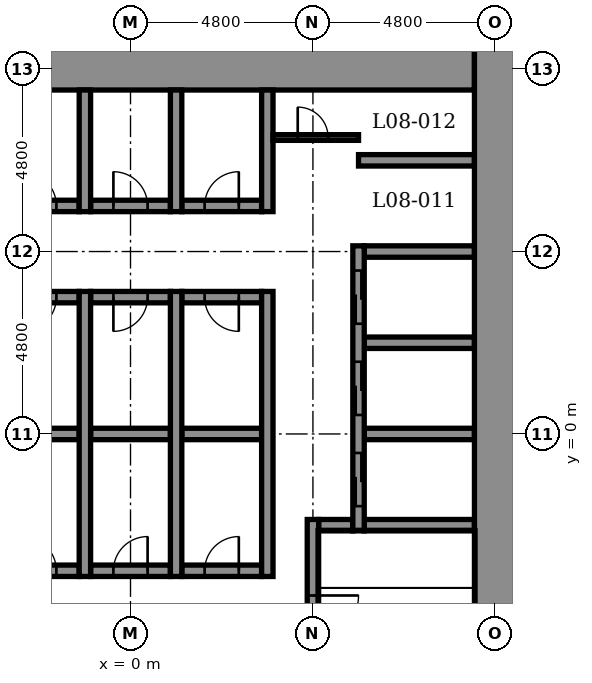
"""IFC4 building model, lengths in metres.
Left out: names, types, materials, properties, quantities, classifications, styles, units other than length and angle.
Written with IfcOpenShell. Run it as: python <this file> out.ifc"""

import sys

from ifc_helpers import new_model, si_unit, direction, frame, frame_2d, origin, place, context, subcontext, project, spatial, rectangle, extrude, element, fill, save


model = new_model("IFC4")
c1 = context("Model", 3, precision=1e-05, world=origin(), true_north=direction((0.0, 1.0)))
c2 = subcontext(c1, "Body", "Model", "MODEL_VIEW")
j1 = project(units=[si_unit("LENGTHUNIT", "METRE"), si_unit("PLANEANGLEUNIT", "RADIAN")], contexts=[c1])
p1 = place(None, origin())
s1 = spatial("IfcSite", under=j1, at=p1, CompositionType="ELEMENT")
p2 = place(p1, origin())
s2 = spatial("IfcBuilding", under=s1, at=p2, CompositionType="ELEMENT")
p3 = place(p2, frame((0.0, 0.0, 44.4)))
s3 = spatial("IfcBuildingStorey", under=s2, at=p3, CompositionType="ELEMENT", Elevation=44.4)
p4 = place(p3, frame((-3.45, -3.6, -0.25), z_axis=(0.0, 0.0, 1.0), x_axis=(1.0, 0.0, 0.0)))
e1 = element("IfcWall", 1, at=p4, inside=s3, PredefinedType="STANDARD", context=c2, shape_type="SweptSolid", body=[
    extrude(rectangle(XDim=2.1, YDim=0.3, at=frame_2d((1.05, 0.0))), origin(), (0.0, 0.0, 1.0), 5.5),
])
p5 = place(p4, frame((0.6, 0.0, 0.25)))
e2 = element("IfcOpeningElement", 2, at=p5, cuts=e1, PredefinedType="OPENING", context=c2, shape_type="SweptSolid", body=[
    extrude(rectangle(XDim=0.9, YDim=2.1, at=frame_2d((0.45, 1.05))), frame((0.0, 0.16, 0.0), z_axis=(0.0, -1.0, 0.0), x_axis=(1.0, 0.0, 0.0)), (0.0, 0.0, 1.0), 0.32),
])
p6 = place(p3, frame((-1.05, -3.6, -0.25), z_axis=(0.0, 0.0, 1.0), x_axis=(1.0, 0.0, 0.0)))
e3 = element("IfcWall", 3, at=p6, inside=s3, PredefinedType="STANDARD", context=c2, shape_type="SweptSolid", body=[
    extrude(rectangle(XDim=2.1, YDim=0.3, at=frame_2d((1.05, 0.0))), origin(), (0.0, 0.0, 1.0), 5.5),
])
p7 = place(p6, frame((0.6, 0.0, 0.25)))
e4 = element("IfcOpeningElement", 4, at=p7, cuts=e3, PredefinedType="OPENING", context=c2, shape_type="SweptSolid", body=[
    extrude(rectangle(XDim=0.9, YDim=2.1, at=frame_2d((0.45, 1.05))), frame((0.0, 0.16, 0.0), z_axis=(0.0, -1.0, 0.0), x_axis=(1.0, 0.0, 0.0)), (0.0, 0.0, 1.0), 0.32),
])
p8 = place(p3, frame((1.35, -3.6, -0.25), z_axis=(0.0, 0.0, 1.0), x_axis=(1.0, 0.0, 0.0)))
e5 = element("IfcWall", 5, at=p8, inside=s3, PredefinedType="STANDARD", context=c2, shape_type="SweptSolid", body=[
    extrude(rectangle(XDim=2.1, YDim=0.3, at=frame_2d((1.05, 0.0))), origin(), (0.0, 0.0, 1.0), 5.5),
])
p9 = place(p8, frame((0.6, 0.0, 0.25)))
e6 = element("IfcOpeningElement", 6, at=p9, cuts=e5, PredefinedType="OPENING", context=c2, shape_type="SweptSolid", body=[
    extrude(rectangle(XDim=0.9, YDim=2.1, at=frame_2d((0.45, 1.05))), frame((0.0, 0.16, 0.0), z_axis=(0.0, -1.0, 0.0), x_axis=(1.0, 0.0, 0.0)), (0.0, 0.0, 1.0), 0.32),
])
p10 = place(p3, frame((4.95, -2.4, -0.25), z_axis=(0.0, 0.0, 1.0), x_axis=(1.0, 0.0, 0.0)))
e7 = element("IfcWall", 7, at=p10, inside=s3, PredefinedType="STANDARD", context=c2, shape_type="SweptSolid", body=[
    extrude(rectangle(XDim=0.9, YDim=0.3, at=frame_2d((0.45, 0.0))), origin(), (0.0, 0.0, 1.0), 5.5),
])
p11 = place(p3, frame((6.15, -2.4, -0.25), z_axis=(0.0, 0.0, 1.0), x_axis=(1.0, 0.0, 0.0)))
e8 = element("IfcWall", 8, at=p11, inside=s3, PredefinedType="STANDARD", context=c2, shape_type="SweptSolid", body=[
    extrude(rectangle(XDim=2.9, YDim=0.3, at=frame_2d((1.45, 0.0))), origin(), (0.0, 0.0, 1.0), 5.5),
])
p12 = place(p3, frame((-3.45, 0.0, -0.25), z_axis=(0.0, 0.0, 1.0), x_axis=(1.0, 0.0, 0.0)))
e9 = element("IfcWall", 9, at=p12, inside=s3, PredefinedType="STANDARD", context=c2, shape_type="SweptSolid", body=[
    extrude(rectangle(XDim=2.1, YDim=0.3, at=frame_2d((1.05, 0.0))), origin(), (0.0, 0.0, 1.0), 5.5),
])
p13 = place(p3, frame((-1.05, 0.0, -0.25), z_axis=(0.0, 0.0, 1.0), x_axis=(1.0, 0.0, 0.0)))
e10 = element("IfcWall", 10, at=p13, inside=s3, PredefinedType="STANDARD", context=c2, shape_type="SweptSolid", body=[
    extrude(rectangle(XDim=2.1, YDim=0.3, at=frame_2d((1.05, 0.0))), origin(), (0.0, 0.0, 1.0), 5.5),
])
p14 = place(p3, frame((1.35, 0.0, -0.25), z_axis=(0.0, 0.0, 1.0), x_axis=(1.0, 0.0, 0.0)))
e11 = element("IfcWall", 11, at=p14, inside=s3, PredefinedType="STANDARD", context=c2, shape_type="SweptSolid", body=[
    extrude(rectangle(XDim=2.1, YDim=0.3, at=frame_2d((1.05, 0.0))), origin(), (0.0, 0.0, 1.0), 5.5),
])
for number, where, z_axis, x_axis in (
    (12, (6.15, 0.0, -0.25), (0.0, 0.0, 1.0), (1.0, 0.0, 0.0)),
    (13, (6.15, 2.4, -0.25), (0.0, 0.0, 1.0), (1.0, 0.0, 0.0)),
):
    element("IfcWall", number, at=place(p3, frame(where, z_axis=z_axis, x_axis=x_axis)), inside=s3, PredefinedType="STANDARD", context=c2, shape_type="SweptSolid", body=[
        extrude(rectangle(XDim=2.9, YDim=0.3, at=frame_2d((1.45, 0.0))), origin(), (0.0, 0.0, 1.0), 5.5),
    ])
p15 = place(p3, frame((-3.45, 3.6, -0.25), z_axis=(0.0, 0.0, 1.0), x_axis=(1.0, 0.0, 0.0)))
e14 = element("IfcWall", 14, at=p15, inside=s3, PredefinedType="STANDARD", context=c2, shape_type="SweptSolid", body=[
    extrude(rectangle(XDim=2.1, YDim=0.3, at=frame_2d((1.05, 0.0))), origin(), (0.0, 0.0, 1.0), 5.5),
])
p16 = place(p15, frame((0.6, 0.0, 0.25)))
e15 = element("IfcOpeningElement", 15, at=p16, cuts=e14, PredefinedType="OPENING", context=c2, shape_type="SweptSolid", body=[
    extrude(rectangle(XDim=0.9, YDim=2.1, at=frame_2d((0.45, 1.05))), frame((0.0, 0.16, 0.0), z_axis=(0.0, -1.0, 0.0), x_axis=(1.0, 0.0, 0.0)), (0.0, 0.0, 1.0), 0.32),
])
p17 = place(p3, frame((-1.05, 3.6, -0.25), z_axis=(0.0, 0.0, 1.0), x_axis=(1.0, 0.0, 0.0)))
e16 = element("IfcWall", 16, at=p17, inside=s3, PredefinedType="STANDARD", context=c2, shape_type="SweptSolid", body=[
    extrude(rectangle(XDim=2.1, YDim=0.3, at=frame_2d((1.05, 0.0))), origin(), (0.0, 0.0, 1.0), 5.5),
])
p18 = place(p17, frame((0.6, 0.0, 0.25)))
e17 = element("IfcOpeningElement", 17, at=p18, cuts=e16, PredefinedType="OPENING", context=c2, shape_type="SweptSolid", body=[
    extrude(rectangle(XDim=0.9, YDim=2.1, at=frame_2d((0.45, 1.05))), frame((0.0, 0.16, 0.0), z_axis=(0.0, -1.0, 0.0), x_axis=(1.0, 0.0, 0.0)), (0.0, 0.0, 1.0), 0.32),
])
p19 = place(p3, frame((1.35, 3.6, -0.25), z_axis=(0.0, 0.0, 1.0), x_axis=(1.0, 0.0, 0.0)))
e18 = element("IfcWall", 18, at=p19, inside=s3, PredefinedType="STANDARD", context=c2, shape_type="SweptSolid", body=[
    extrude(rectangle(XDim=2.1, YDim=0.3, at=frame_2d((1.05, 0.0))), origin(), (0.0, 0.0, 1.0), 5.5),
])
p20 = place(p19, frame((0.6, 0.0, 0.25)))
e19 = element("IfcOpeningElement", 19, at=p20, cuts=e18, PredefinedType="OPENING", context=c2, shape_type="SweptSolid", body=[
    extrude(rectangle(XDim=0.9, YDim=2.1, at=frame_2d((0.45, 1.05))), frame((0.0, 0.16, 0.0), z_axis=(0.0, -1.0, 0.0), x_axis=(1.0, 0.0, 0.0)), (0.0, 0.0, 1.0), 0.32),
])
p21 = place(p3, frame((6.15, 4.8, -0.25), z_axis=(0.0, 0.0, 1.0), x_axis=(1.0, 0.0, 0.0)))
e20 = element("IfcWall", 20, at=p21, inside=s3, PredefinedType="STANDARD", context=c2, shape_type="SweptSolid", body=[
    extrude(rectangle(XDim=2.9, YDim=0.3, at=frame_2d((1.45, 0.0))), origin(), (0.0, 0.0, 1.0), 5.5),
])
p22 = place(p3, frame((-3.45, 6.0, -0.25), z_axis=(0.0, 0.0, 1.0), x_axis=(1.0, 0.0, 0.0)))
e21 = element("IfcWall", 21, at=p22, inside=s3, PredefinedType="STANDARD", context=c2, shape_type="SweptSolid", body=[
    extrude(rectangle(XDim=2.1, YDim=0.3, at=frame_2d((1.05, 0.0))), origin(), (0.0, 0.0, 1.0), 5.5),
])
p23 = place(p22, frame((0.6, 0.0, 0.25)))
e22 = element("IfcOpeningElement", 22, at=p23, cuts=e21, PredefinedType="OPENING", context=c2, shape_type="SweptSolid", body=[
    extrude(rectangle(XDim=0.9, YDim=2.1, at=frame_2d((0.45, 1.05))), frame((0.0, 0.16, 0.0), z_axis=(0.0, -1.0, 0.0), x_axis=(1.0, 0.0, 0.0)), (0.0, 0.0, 1.0), 0.32),
])
p24 = place(p3, frame((-1.05, 6.0, -0.25), z_axis=(0.0, 0.0, 1.0), x_axis=(1.0, 0.0, 0.0)))
e23 = element("IfcWall", 23, at=p24, inside=s3, PredefinedType="STANDARD", context=c2, shape_type="SweptSolid", body=[
    extrude(rectangle(XDim=2.1, YDim=0.3, at=frame_2d((1.05, 0.0))), origin(), (0.0, 0.0, 1.0), 5.5),
])
p25 = place(p24, frame((0.6, 0.0, 0.25)))
e24 = element("IfcOpeningElement", 24, at=p25, cuts=e23, PredefinedType="OPENING", context=c2, shape_type="SweptSolid", body=[
    extrude(rectangle(XDim=0.9, YDim=2.1, at=frame_2d((0.45, 1.05))), frame((0.0, 0.16, 0.0), z_axis=(0.0, -1.0, 0.0), x_axis=(1.0, 0.0, 0.0)), (0.0, 0.0, 1.0), 0.32),
])
p26 = place(p3, frame((1.35, 6.0, -0.25), z_axis=(0.0, 0.0, 1.0), x_axis=(1.0, 0.0, 0.0)))
e25 = element("IfcWall", 25, at=p26, inside=s3, PredefinedType="STANDARD", context=c2, shape_type="SweptSolid", body=[
    extrude(rectangle(XDim=2.1, YDim=0.3, at=frame_2d((1.05, 0.0))), origin(), (0.0, 0.0, 1.0), 5.5),
])
p27 = place(p26, frame((0.6, 0.0, 0.25)))
e26 = element("IfcOpeningElement", 26, at=p27, cuts=e25, PredefinedType="OPENING", context=c2, shape_type="SweptSolid", body=[
    extrude(rectangle(XDim=0.9, YDim=2.1, at=frame_2d((0.45, 1.05))), frame((0.0, 0.16, 0.0), z_axis=(0.0, -1.0, 0.0), x_axis=(1.0, 0.0, 0.0)), (0.0, 0.0, 1.0), 0.32),
])
p28 = place(p3, frame((6.0, 7.2, -0.25), z_axis=(0.0, 0.0, 1.0), x_axis=(1.0, 0.0, 0.0)))
e27 = element("IfcWall", 27, at=p28, inside=s3, PredefinedType="STANDARD", context=c2, shape_type="SweptSolid", body=[
    extrude(rectangle(XDim=3.05, YDim=0.3, at=frame_2d((1.525, 0.0))), origin(), (0.0, 0.0, 1.0), 5.5),
])
p29 = place(p3, frame((-5.25, 9.6, -0.25), z_axis=(0.0, 0.0, 1.0), x_axis=(1.0, 0.0, 0.0)))
e28 = element("IfcWall", 28, at=p29, inside=s3, PredefinedType="SHEAR", context=c2, shape_type="SweptSolid", body=[
    extrude(rectangle(XDim=14.3, YDim=1.1, at=frame_2d((7.15, 0.0))), origin(), (0.0, 0.0, 1.0), 5.5),
])
p30 = place(p29, frame((0.6, 0.0, 0.25)))
e29 = element("IfcOpeningElement", 29, at=p30, cuts=e28, PredefinedType="OPENING", context=c2, shape_type="SweptSolid", body=[
    extrude(rectangle(XDim=0.9, YDim=2.1, at=frame_2d((0.45, 1.05))), frame((0.0, 0.56, 0.0), z_axis=(0.0, -1.0, 0.0), x_axis=(1.0, 0.0, 0.0)), (0.0, 0.0, 1.0), 1.12),
])
p31 = place(p3, frame((-1.2, -3.75, -0.25), z_axis=(0.0, 0.0, 1.0), x_axis=(0.0, 1.0, 0.0)))
e30 = element("IfcWall", 30, at=p31, inside=s3, PredefinedType="STANDARD", context=c2, shape_type="SweptSolid", body=[
    extrude(rectangle(XDim=7.5, YDim=0.3, at=frame_2d((3.75, 0.0))), origin(), (0.0, 0.0, 1.0), 5.5),
])
p32 = place(p3, frame((-1.2, 5.85, -0.25), z_axis=(0.0, 0.0, 1.0), x_axis=(0.0, 1.0, 0.0)))
e31 = element("IfcWall", 31, at=p32, inside=s3, PredefinedType="STANDARD", context=c2, shape_type="SweptSolid", body=[
    extrude(rectangle(XDim=3.2, YDim=0.3, at=frame_2d((1.6, 0.0))), origin(), (0.0, 0.0, 1.0), 5.5),
])
p33 = place(p3, frame((1.2, -3.75, -0.25), z_axis=(0.0, 0.0, 1.0), x_axis=(0.0, 1.0, 0.0)))
e32 = element("IfcWall", 32, at=p33, inside=s3, PredefinedType="STANDARD", context=c2, shape_type="SweptSolid", body=[
    extrude(rectangle(XDim=7.5, YDim=0.3, at=frame_2d((3.75, 0.0))), origin(), (0.0, 0.0, 1.0), 5.5),
])
p34 = place(p3, frame((1.2, 5.85, -0.25), z_axis=(0.0, 0.0, 1.0), x_axis=(0.0, 1.0, 0.0)))
e33 = element("IfcWall", 33, at=p34, inside=s3, PredefinedType="STANDARD", context=c2, shape_type="SweptSolid", body=[
    extrude(rectangle(XDim=3.2, YDim=0.3, at=frame_2d((1.6, 0.0))), origin(), (0.0, 0.0, 1.0), 5.5),
])
p35 = place(p3, frame((3.6, -3.75, -0.25), z_axis=(0.0, 0.0, 1.0), x_axis=(0.0, 1.0, 0.0)))
e34 = element("IfcWall", 34, at=p35, inside=s3, PredefinedType="STANDARD", context=c2, shape_type="SweptSolid", body=[
    extrude(rectangle(XDim=7.5, YDim=0.3, at=frame_2d((3.75, 0.0))), origin(), (0.0, 0.0, 1.0), 5.5),
])
p36 = place(p3, frame((3.6, 5.85, -0.25), z_axis=(0.0, 0.0, 1.0), x_axis=(0.0, 1.0, 0.0)))
e35 = element("IfcWall", 35, at=p36, inside=s3, PredefinedType="STANDARD", context=c2, shape_type="SweptSolid", body=[
    extrude(rectangle(XDim=3.2, YDim=0.3, at=frame_2d((1.6, 0.0))), origin(), (0.0, 0.0, 1.0), 5.5),
])
p37 = place(p3, frame((4.8, -9.05, -0.25), z_axis=(0.0, 0.0, 1.0), x_axis=(0.0, 1.0, 0.0)))
e36 = element("IfcWall", 36, at=p37, inside=s3, PredefinedType="STANDARD", context=c2, shape_type="SweptSolid", body=[
    extrude(rectangle(XDim=6.8, YDim=0.3, at=frame_2d((3.4, 0.0))), origin(), (0.0, 0.0, 1.0), 5.5),
])
p38 = place(p37, frame((3.6, 0.0, 0.25)))
e37 = element("IfcOpeningElement", 37, at=p38, cuts=e36, PredefinedType="OPENING", context=c2, shape_type="SweptSolid", body=[
    extrude(rectangle(XDim=1.2, YDim=2.1, at=frame_2d((0.6, 1.05))), frame((0.0, 0.16, 0.0), z_axis=(0.0, -1.0, 0.0), x_axis=(1.0, 0.0, 0.0)), (0.0, 0.0, 1.0), 0.32),
])
p39 = place(p3, frame((6.0, -2.55, -0.25), z_axis=(0.0, 0.0, 1.0), x_axis=(0.0, 1.0, 0.0)))
e38 = element("IfcWall", 38, at=p39, inside=s3, PredefinedType="STANDARD", context=c2, shape_type="SweptSolid", body=[
    extrude(rectangle(XDim=7.5, YDim=0.3, at=frame_2d((3.75, 0.0))), origin(), (0.0, 0.0, 1.0), 5.5),
])
p40 = place(p39, frame((0.65, 0.0, 0.25)))
e39 = element("IfcOpeningElement", 39, at=p40, cuts=e38, PredefinedType="OPENING", context=c2, shape_type="SweptSolid", body=[
    extrude(rectangle(XDim=1.4, YDim=2.1, at=frame_2d((0.7, 1.05))), frame((0.0, 0.16, 0.0), z_axis=(0.0, -1.0, 0.0), x_axis=(1.0, 0.0, 0.0)), (0.0, 0.0, 1.0), 0.32),
])
p41 = place(p39, frame((3.05, 0.0, 0.25)))
e40 = element("IfcOpeningElement", 40, at=p41, cuts=e38, PredefinedType="OPENING", context=c2, shape_type="SweptSolid", body=[
    extrude(rectangle(XDim=1.4, YDim=2.1, at=frame_2d((0.7, 1.05))), frame((0.0, 0.16, 0.0), z_axis=(0.0, -1.0, 0.0), x_axis=(1.0, 0.0, 0.0)), (0.0, 0.0, 1.0), 0.32),
])
p42 = place(p39, frame((5.45, 0.0, 0.25)))
e41 = element("IfcOpeningElement", 41, at=p42, cuts=e38, PredefinedType="OPENING", context=c2, shape_type="SweptSolid", body=[
    extrude(rectangle(XDim=1.4, YDim=2.1, at=frame_2d((0.7, 1.05))), frame((0.0, 0.16, 0.0), z_axis=(0.0, -1.0, 0.0), x_axis=(1.0, 0.0, 0.0)), (0.0, 0.0, 1.0), 0.32),
])
p43 = place(p3, frame((9.6, -10.15, -0.25), z_axis=(0.0, 0.0, 1.0), x_axis=(0.0, 1.0, 0.0)))
e42 = element("IfcWall", 42, at=p43, inside=s3, PredefinedType="SHEAR", context=c2, shape_type="SweptSolid", body=[
    extrude(rectangle(XDim=20.3, YDim=1.1, at=frame_2d((10.15, 0.0))), origin(), (0.0, 0.0, 1.0), 5.5),
])
p44 = place(p3, frame((3.75, 7.8, 0.0), z_axis=(0.0, 0.0, 1.0), x_axis=(1.0, 0.0, 0.0)))
e43 = element("IfcWall", 43, at=p44, inside=s3, PredefinedType="PARTITIONING", context=c2, shape_type="SweptSolid", body=[
    extrude(rectangle(XDim=2.25, YDim=0.15, at=frame_2d((1.125, 0.0))), origin(), (0.0, 0.0, 1.0), 5.25),
])
p45 = place(p44, frame((0.65, 0.0, 0.0)))
e44 = element("IfcOpeningElement", 44, at=p45, cuts=e43, PredefinedType="OPENING", context=c2, shape_type="SweptSolid", body=[
    extrude(rectangle(XDim=0.8, YDim=2.1, at=frame_2d((0.4, 1.05))), frame((0.0, 0.085, 0.0), z_axis=(0.0, -1.0, 0.0), x_axis=(1.0, 0.0, 0.0)), (0.0, 0.0, 1.0), 0.17),
])
p46 = place(p45, origin())
e45 = element("IfcDoor", 45, at=p46, inside=s3, OperationType="SINGLE_SWING_LEFT", PredefinedType="DOOR", context=c2, shape_type="SweptSolid", body=[
    extrude(rectangle(XDim=0.8, YDim=2.1, at=frame_2d((0.4, 1.05))), frame((0.0, 0.025, 0.0), z_axis=(0.0, -1.0, 0.0), x_axis=(1.0, 0.0, 0.0)), (0.0, 0.0, 1.0), 0.05),
])
fill(e44, e45)
p47 = place(p40, origin())
e46 = element("IfcDoor", 46, at=p47, inside=s3, OperationType="DOUBLE_DOOR_SLIDING", PredefinedType="DOOR", context=c2, shape_type="SweptSolid", body=[
    extrude(rectangle(XDim=1.4, YDim=2.1, at=frame_2d((0.7, 1.05))), frame((0.0, 0.025, 0.0), z_axis=(0.0, -1.0, 0.0), x_axis=(1.0, 0.0, 0.0)), (0.0, 0.0, 1.0), 0.05),
])
fill(e39, e46)
p48 = place(p41, origin())
e47 = element("IfcDoor", 47, at=p48, inside=s3, OperationType="DOUBLE_DOOR_SLIDING", PredefinedType="DOOR", context=c2, shape_type="SweptSolid", body=[
    extrude(rectangle(XDim=1.4, YDim=2.1, at=frame_2d((0.7, 1.05))), frame((0.0, 0.025, 0.0), z_axis=(0.0, -1.0, 0.0), x_axis=(1.0, 0.0, 0.0)), (0.0, 0.0, 1.0), 0.05),
])
fill(e40, e47)
p49 = place(p42, origin())
e48 = element("IfcDoor", 48, at=p49, inside=s3, OperationType="DOUBLE_DOOR_SLIDING", PredefinedType="DOOR", context=c2, shape_type="SweptSolid", body=[
    extrude(rectangle(XDim=1.4, YDim=2.1, at=frame_2d((0.7, 1.05))), frame((0.0, 0.025, 0.0), z_axis=(0.0, -1.0, 0.0), x_axis=(1.0, 0.0, 0.0)), (0.0, 0.0, 1.0), 0.05),
])
fill(e41, e48)
p50 = place(p38, frame((1.2, 0.0, 0.0), z_axis=(0.0, 0.0, 1.0), x_axis=(-1.0, 0.0, 0.0)))
e49 = element("IfcDoor", 49, at=p50, inside=s3, OperationType="SINGLE_SWING_RIGHT", PredefinedType="DOOR", context=c2, shape_type="SweptSolid", body=[
    extrude(rectangle(XDim=1.2, YDim=2.1, at=frame_2d((0.6, 1.05))), frame((0.0, 0.025, 0.0), z_axis=(0.0, -1.0, 0.0), x_axis=(1.0, 0.0, 0.0)), (0.0, 0.0, 1.0), 0.05),
])
fill(e37, e49)
p51 = place(p23, origin())
e50 = element("IfcDoor", 50, at=p51, inside=s3, OperationType="SINGLE_SWING_LEFT", PredefinedType="DOOR", context=c2, shape_type="SweptSolid", body=[
    extrude(rectangle(XDim=0.9, YDim=2.1, at=frame_2d((0.45, 1.05))), frame((0.0, 0.025, 0.0), z_axis=(0.0, -1.0, 0.0), x_axis=(1.0, 0.0, 0.0)), (0.0, 0.0, 1.0), 0.05),
])
fill(e22, e50)
p52 = place(p25, origin())
e51 = element("IfcDoor", 51, at=p52, inside=s3, OperationType="SINGLE_SWING_LEFT", PredefinedType="DOOR", context=c2, shape_type="SweptSolid", body=[
    extrude(rectangle(XDim=0.9, YDim=2.1, at=frame_2d((0.45, 1.05))), frame((0.0, 0.025, 0.0), z_axis=(0.0, -1.0, 0.0), x_axis=(1.0, 0.0, 0.0)), (0.0, 0.0, 1.0), 0.05),
])
fill(e24, e51)
p53 = place(p27, origin())
e52 = element("IfcDoor", 52, at=p53, inside=s3, OperationType="SINGLE_SWING_RIGHT", PredefinedType="DOOR", context=c2, shape_type="SweptSolid", body=[
    extrude(rectangle(XDim=0.9, YDim=2.1, at=frame_2d((0.45, 1.05))), frame((0.0, 0.025, 0.0), z_axis=(0.0, -1.0, 0.0), x_axis=(1.0, 0.0, 0.0)), (0.0, 0.0, 1.0), 0.05),
])
fill(e26, e52)
p54 = place(p16, frame((0.9, 0.0, 0.0), z_axis=(0.0, 0.0, 1.0), x_axis=(-1.0, 0.0, 0.0)))
e53 = element("IfcDoor", 53, at=p54, inside=s3, OperationType="SINGLE_SWING_LEFT", PredefinedType="DOOR", context=c2, shape_type="SweptSolid", body=[
    extrude(rectangle(XDim=0.9, YDim=2.1, at=frame_2d((0.45, 1.05))), frame((0.0, 0.025, 0.0), z_axis=(0.0, -1.0, 0.0), x_axis=(1.0, 0.0, 0.0)), (0.0, 0.0, 1.0), 0.05),
])
fill(e15, e53)
p55 = place(p18, frame((0.9, 0.0, 0.0), z_axis=(0.0, 0.0, 1.0), x_axis=(-1.0, 0.0, 0.0)))
e54 = element("IfcDoor", 54, at=p55, inside=s3, OperationType="SINGLE_SWING_LEFT", PredefinedType="DOOR", context=c2, shape_type="SweptSolid", body=[
    extrude(rectangle(XDim=0.9, YDim=2.1, at=frame_2d((0.45, 1.05))), frame((0.0, 0.025, 0.0), z_axis=(0.0, -1.0, 0.0), x_axis=(1.0, 0.0, 0.0)), (0.0, 0.0, 1.0), 0.05),
])
fill(e17, e54)
p56 = place(p20, frame((0.9, 0.0, 0.0), z_axis=(0.0, 0.0, 1.0), x_axis=(-1.0, 0.0, 0.0)))
e55 = element("IfcDoor", 55, at=p56, inside=s3, OperationType="SINGLE_SWING_RIGHT", PredefinedType="DOOR", context=c2, shape_type="SweptSolid", body=[
    extrude(rectangle(XDim=0.9, YDim=2.1, at=frame_2d((0.45, 1.05))), frame((0.0, 0.025, 0.0), z_axis=(0.0, -1.0, 0.0), x_axis=(1.0, 0.0, 0.0)), (0.0, 0.0, 1.0), 0.05),
])
fill(e19, e55)
p57 = place(p5, origin())
e56 = element("IfcDoor", 56, at=p57, inside=s3, OperationType="SINGLE_SWING_LEFT", PredefinedType="DOOR", context=c2, shape_type="SweptSolid", body=[
    extrude(rectangle(XDim=0.9, YDim=2.1, at=frame_2d((0.45, 1.05))), frame((0.0, 0.025, 0.0), z_axis=(0.0, -1.0, 0.0), x_axis=(1.0, 0.0, 0.0)), (0.0, 0.0, 1.0), 0.05),
])
fill(e2, e56)
p58 = place(p7, origin())
e57 = element("IfcDoor", 57, at=p58, inside=s3, OperationType="SINGLE_SWING_RIGHT", PredefinedType="DOOR", context=c2, shape_type="SweptSolid", body=[
    extrude(rectangle(XDim=0.9, YDim=2.1, at=frame_2d((0.45, 1.05))), frame((0.0, 0.025, 0.0), z_axis=(0.0, -1.0, 0.0), x_axis=(1.0, 0.0, 0.0)), (0.0, 0.0, 1.0), 0.05),
])
fill(e4, e57)
p59 = place(p9, origin())
e58 = element("IfcDoor", 58, at=p59, inside=s3, OperationType="SINGLE_SWING_RIGHT", PredefinedType="DOOR", context=c2, shape_type="SweptSolid", body=[
    extrude(rectangle(XDim=0.9, YDim=2.1, at=frame_2d((0.45, 1.05))), frame((0.0, 0.025, 0.0), z_axis=(0.0, -1.0, 0.0), x_axis=(1.0, 0.0, 0.0)), (0.0, 0.0, 1.0), 0.05),
])
fill(e6, e58)
save(model, sys.argv[1])
